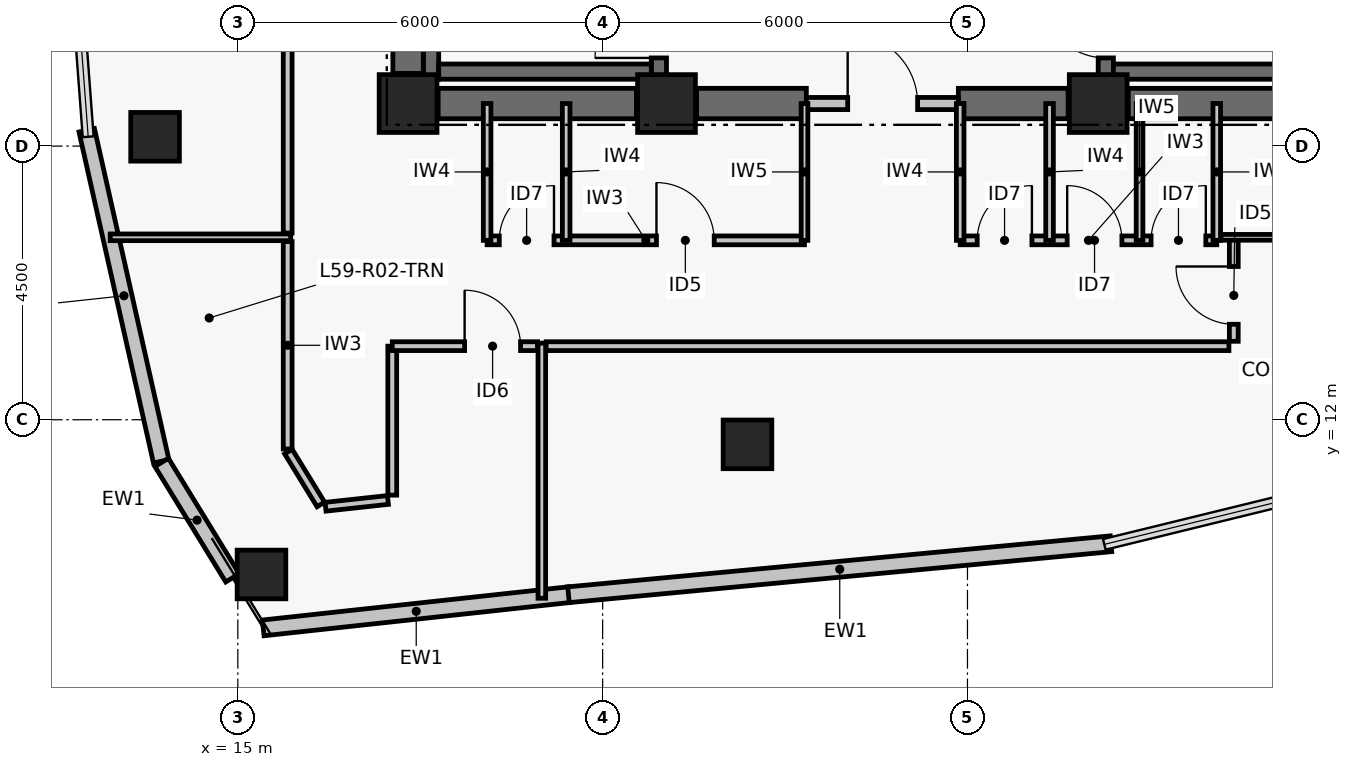
"""IFC4 building model, lengths in metres.
Left out: names, types, materials, properties, quantities, classifications, styles, units other than length and angle.
Written with IfcOpenShell. Run it as: python <this file> out.ifc"""

import sys

from ifc_helpers import new_model, si_unit, direction, frame, frame_2d, origin, origin_2d, place, context, subcontext, project, spatial, rectangle, hollow_rectangle, extrude, element, fill, save


model = new_model("IFC4")
c1 = context("Model", 3, precision=1e-05, world=origin(), true_north=direction((0.0, 1.0)))
c2 = subcontext(c1, "Body", "Model", "MODEL_VIEW")
j1 = project(units=[si_unit("LENGTHUNIT", "METRE"), si_unit("PLANEANGLEUNIT", "RADIAN")], contexts=[c1])
p1 = place(None, origin())
s1 = spatial("IfcSite", under=j1, at=p1, CompositionType="ELEMENT")
p2 = place(p1, origin())
s2 = spatial("IfcBuilding", under=s1, at=p2, CompositionType="ELEMENT")
p3 = place(p2, frame((0.0, 0.0, 234.42)))
s3 = spatial("IfcBuildingStorey", under=s2, at=p3, CompositionType="ELEMENT", Elevation=234.42)
for number, where, z_axis, x_axis in (
    (1, (17.8, 17.2, 0.0), (0.0, 0.0, 1.0), (1.0, 0.0, 0.0)),
    (2, (22.05, 17.2, 0.0), (0.0, 0.0, 1.0), (1.0, 0.0, 0.0)),
    (3, (29.15, 17.2, 0.0), (0.0, 0.0, 1.0), (1.0, 0.0, 0.0)),
):
    element("IfcColumn", number, at=place(p3, frame(where, z_axis=z_axis, x_axis=x_axis)), inside=s3, PredefinedType="COLUMN", context=c2, shape_type="SweptSolid", body=[
        extrude(rectangle(XDim=0.95, YDim=0.95, at=origin_2d()), origin(), (0.0, 0.0, 1.0), 3.72),
    ])
p4 = place(p3, frame((18.295, 17.2, 0.0), z_axis=(0.0, 0.0, 1.0), x_axis=(1.0, 0.0, 0.0)))
e4 = element("IfcWall", 4, at=p4, inside=s3, PredefinedType="SHEAR", context=c2, shape_type="SweptSolid", body=[
    extrude(rectangle(XDim=3.26, YDim=0.5, at=frame_2d((1.63, 0.0))), origin(), (0.0, 0.0, 1.0), 3.44),
])
p5 = place(p3, frame((22.545, 17.2, 0.0), z_axis=(0.0, 0.0, 1.0), x_axis=(1.0, 0.0, 0.0)))
e5 = element("IfcWall", 5, at=p5, inside=s3, PredefinedType="SHEAR", context=c2, shape_type="SweptSolid", body=[
    extrude(rectangle(XDim=1.805, YDim=0.5, at=frame_2d((0.903, 0.0))), origin(), (0.0, 0.0, 1.0), 3.44),
])
p6 = place(p3, frame((26.85, 17.2, 0.0), z_axis=(0.0, 0.0, 1.0), x_axis=(1.0, 0.0, 0.0)))
e6 = element("IfcWall", 6, at=p6, inside=s3, PredefinedType="SHEAR", context=c2, shape_type="SweptSolid", body=[
    extrude(rectangle(XDim=1.805, YDim=0.5, at=frame_2d((0.902, 0.0))), origin(), (0.0, 0.0, 1.0), 3.44),
])
p7 = place(p3, frame((29.645, 17.2, 0.0), z_axis=(0.0, 0.0, 1.0), x_axis=(1.0, 0.0, 0.0)))
e7 = element("IfcWall", 7, at=p7, inside=s3, PredefinedType="SHEAR", context=c2, shape_type="SweptSolid", body=[
    extrude(rectangle(XDim=3.26, YDim=0.5, at=frame_2d((1.63, 0.0))), origin(), (0.0, 0.0, 1.0), 3.44),
])
p8 = place(p3, frame((17.8, 17.695, 0.0), z_axis=(0.0, 0.0, 1.0), x_axis=(0.0, 1.0, 0.0)))
e8 = element("IfcWall", 8, at=p8, inside=s3, PredefinedType="SHEAR", context=c2, shape_type="SweptSolid", body=[
    extrude(rectangle(XDim=8.61, YDim=0.5, at=frame_2d((4.305, 0.0))), origin(), (0.0, 0.0, 1.0), 3.44),
])
p9 = place(p3, frame((18.179, 17.6, 0.0), z_axis=(0.0, 0.0, 1.0), x_axis=(0.0, 1.0, 0.0)))
e9 = element("IfcWall", 9, at=p9, inside=s3, PredefinedType="SHEAR", context=c2, shape_type="SweptSolid", body=[
    extrude(rectangle(XDim=8.8, YDim=0.25, at=frame_2d((4.4, 0.0))), origin(), (0.0, 0.0, 1.0), 3.44),
])
p10 = place(p3, frame((21.925, 17.6, 0.0), z_axis=(0.0, 0.0, 1.0), x_axis=(0.0, 1.0, 0.0)))
e10 = element("IfcWall", 10, at=p10, inside=s3, PredefinedType="SHEAR", context=c2, shape_type="SweptSolid", body=[
    extrude(rectangle(XDim=8.8, YDim=0.25, at=frame_2d((4.4, 0.0))), origin(), (0.0, 0.0, 1.0), 3.44),
])
p11 = place(p10, frame((0.35, 0.0, 0.0)))
e11 = element("IfcOpeningElement", 11, at=p11, cuts=e10, PredefinedType="OPENING", context=c2, shape_type="SweptSolid", body=[
    extrude(rectangle(XDim=1.05, YDim=2.08, at=frame_2d((0.525, 1.04))), frame((0.0, 0.135, 0.0), z_axis=(0.0, -1.0, 0.0), x_axis=(1.0, 0.0, 0.0)), (0.0, 0.0, 1.0), 0.27),
])
p12 = place(p3, frame((18.304, 17.725, 0.0), z_axis=(0.0, 0.0, 1.0), x_axis=(1.0, 0.0, 0.0)))
e12 = element("IfcWall", 12, at=p12, inside=s3, PredefinedType="SHEAR", context=c2, shape_type="SweptSolid", body=[
    extrude(rectangle(XDim=3.496, YDim=0.25, at=frame_2d((1.748, 0.0))), origin(), (0.0, 0.0, 1.0), 3.44),
])
p13 = place(p3, frame((29.275, 17.6, 0.0), z_axis=(0.0, 0.0, 1.0), x_axis=(0.0, 1.0, 0.0)))
e13 = element("IfcWall", 13, at=p13, inside=s3, PredefinedType="SHEAR", context=c2, shape_type="SweptSolid", body=[
    extrude(rectangle(XDim=8.8, YDim=0.25, at=frame_2d((4.4, 0.0))), origin(), (0.0, 0.0, 1.0), 3.44),
])
p14 = place(p13, frame((0.35, 0.0, 0.0)))
e14 = element("IfcOpeningElement", 14, at=p14, cuts=e13, PredefinedType="OPENING", context=c2, shape_type="SweptSolid", body=[
    extrude(rectangle(XDim=1.05, YDim=2.08, at=frame_2d((0.525, 1.04))), frame((0.0, 0.135, 0.0), z_axis=(0.0, -1.0, 0.0), x_axis=(1.0, 0.0, 0.0)), (0.0, 0.0, 1.0), 0.27),
])
p15 = place(p3, frame((29.4, 17.725, 0.0), z_axis=(0.0, 0.0, 1.0), x_axis=(1.0, 0.0, 0.0)))
e15 = element("IfcWall", 15, at=p15, inside=s3, PredefinedType="SHEAR", context=c2, shape_type="SweptSolid", body=[
    extrude(rectangle(XDim=3.496, YDim=0.25, at=frame_2d((1.748, 0.0))), origin(), (0.0, 0.0, 1.0), 3.44),
])
for number, where, z_axis, x_axis in (
    (16, (13.639, 16.653, 0.0), (0.0, 0.0, 1.0), (1.0, 0.0, 0.0)),
    (17, (15.389, 9.455, 0.0), (0.0, 0.0, 1.0), (1.0, 0.0, 0.0)),
    (18, (23.382, 11.595, 0.0), (0.0, 0.0, 1.0), (1.0, 0.0, 0.0)),
):
    element("IfcColumn", number, at=place(p3, frame(where, z_axis=z_axis, x_axis=x_axis)), inside=s3, PredefinedType="COLUMN", context=c2, shape_type="SweptSolid", body=[
        extrude(hollow_rectangle(XDim=0.8, YDim=0.8, WallThickness=0.035, at=origin_2d()), origin(), (0.0, 0.0, 1.0), 3.72),
    ])
p16 = place(p3, frame((13.74, 11.317, 0.0), z_axis=(0.0, 0.0, 1.0), x_axis=(-0.219510112872, 0.975610224601, 0.0)))
e19 = element("IfcWall", 19, at=p16, inside=s3, PredefinedType="PARTITIONING", context=c2, shape_type="SweptSolid", body=[
    extrude(rectangle(XDim=5.58, YDim=0.26, at=frame_2d((2.79, 0.0))), origin(), (0.0, 0.0, 1.0), 3.44),
])
p17 = place(p3, frame((14.912, 9.4, 0.0), z_axis=(0.0, 0.0, 1.0), x_axis=(-0.52314291314, 0.852244972077, 0.0)))
e20 = element("IfcWall", 20, at=p17, inside=s3, PredefinedType="PARTITIONING", context=c2, shape_type="SweptSolid", body=[
    extrude(rectangle(XDim=2.227, YDim=0.26, at=frame_2d((1.114, 0.0))), origin(), (0.0, 0.0, 1.0), 3.44),
])
p18 = place(p3, frame((20.45, 9.123, 0.0), z_axis=(0.0, 0.0, 1.0), x_axis=(-0.994158757437, -0.107927591518, 0.0)))
e21 = element("IfcWall", 21, at=p18, inside=s3, PredefinedType="PARTITIONING", context=c2, shape_type="SweptSolid", body=[
    extrude(rectangle(XDim=5.062, YDim=0.26, at=frame_2d((2.531, 0.0))), origin(), (0.0, 0.0, 1.0), 3.44),
])
p19 = place(p3, frame((29.36, 9.96, 0.0), z_axis=(0.0, 0.0, 1.0), x_axis=(-0.995616246459, -0.093532292754, 0.0)))
e22 = element("IfcWall", 22, at=p19, inside=s3, PredefinedType="PARTITIONING", context=c2, shape_type="SweptSolid", body=[
    extrude(rectangle(XDim=8.961, YDim=0.26, at=frame_2d((4.48, 0.0))), origin(), (0.0, 0.0, 1.0), 3.44),
])
p20 = place(p3, frame((24.35, 17.2, 0.0), z_axis=(0.0, 0.0, 1.0), x_axis=(1.0, 0.0, 0.0)))
e23 = element("IfcWall", 23, at=p20, inside=s3, PredefinedType="PARTITIONING", context=c2, shape_type="SweptSolid", body=[
    extrude(rectangle(XDim=2.5, YDim=0.2, at=frame_2d((1.25, 0.0))), origin(), (0.0, 0.0, 1.0), 2.57),
])
p21 = place(p20, frame((0.68, 0.0, 0.0)))
e24 = element("IfcOpeningElement", 24, at=p21, cuts=e23, PredefinedType="OPENING", context=c2, shape_type="SweptSolid", body=[
    extrude(rectangle(XDim=1.15, YDim=2.08, at=frame_2d((0.575, 1.04))), frame((0.0, 0.11, 0.0), z_axis=(0.0, -1.0, 0.0), x_axis=(1.0, 0.0, 0.0)), (0.0, 0.0, 1.0), 0.22),
])
p22 = place(p3, frame((19.1, 14.95, 0.0), z_axis=(0.0, 0.0, 1.0), x_axis=(1.0, 0.0, 0.0)))
e25 = element("IfcWall", 25, at=p22, inside=s3, PredefinedType="PARTITIONING", context=c2, shape_type="SweptSolid", body=[
    extrude(rectangle(XDim=5.22, YDim=0.145, at=frame_2d((2.61, 0.0))), origin(), (0.0, 0.0, 1.0), 2.72),
])
p23 = place(p22, frame((0.2, 0.0, 0.0)))
e26 = element("IfcOpeningElement", 26, at=p23, cuts=e25, PredefinedType="OPENING", context=c2, shape_type="SweptSolid", body=[
    extrude(rectangle(XDim=0.9, YDim=2.02, at=frame_2d((0.45, 1.01))), frame((0.0, 0.083, 0.0), z_axis=(0.0, -1.0, 0.0), x_axis=(1.0, 0.0, 0.0)), (0.0, 0.0, 1.0), 0.165),
])
p24 = place(p22, frame((2.785, 0.0, 0.0)))
e27 = element("IfcOpeningElement", 27, at=p24, cuts=e25, PredefinedType="OPENING", context=c2, shape_type="SweptSolid", body=[
    extrude(rectangle(XDim=0.95, YDim=2.06, at=frame_2d((0.475, 1.03))), frame((0.0, 0.083, 0.0), z_axis=(0.0, -1.0, 0.0), x_axis=(1.0, 0.0, 0.0)), (0.0, 0.0, 1.0), 0.165),
])
p25 = place(p3, frame((26.88, 14.95, 0.0), z_axis=(0.0, 0.0, 1.0), x_axis=(1.0, 0.0, 0.0)))
e28 = element("IfcWall", 28, at=p25, inside=s3, PredefinedType="PARTITIONING", context=c2, shape_type="SweptSolid", body=[
    extrude(rectangle(XDim=4.22, YDim=0.145, at=frame_2d((2.11, 0.0))), origin(), (0.0, 0.0, 1.0), 2.92),
])
p26 = place(p25, frame((0.28, 0.0, 0.0)))
e29 = element("IfcOpeningElement", 29, at=p26, cuts=e28, PredefinedType="OPENING", context=c2, shape_type="SweptSolid", body=[
    extrude(rectangle(XDim=0.9, YDim=2.02, at=frame_2d((0.45, 1.01))), frame((0.0, 0.083, 0.0), z_axis=(0.0, -1.0, 0.0), x_axis=(1.0, 0.0, 0.0)), (0.0, 0.0, 1.0), 0.165),
])
p27 = place(p25, frame((1.76, 0.0, 0.0)))
e30 = element("IfcOpeningElement", 30, at=p27, cuts=e28, PredefinedType="OPENING", context=c2, shape_type="SweptSolid", body=[
    extrude(rectangle(XDim=0.9, YDim=2.02, at=frame_2d((0.45, 1.01))), frame((0.0, 0.083, 0.0), z_axis=(0.0, -1.0, 0.0), x_axis=(1.0, 0.0, 0.0)), (0.0, 0.0, 1.0), 0.165),
])
p28 = place(p25, frame((3.14, 0.0, 0.0)))
e31 = element("IfcOpeningElement", 31, at=p28, cuts=e28, PredefinedType="OPENING", context=c2, shape_type="SweptSolid", body=[
    extrude(rectangle(XDim=0.9, YDim=2.02, at=frame_2d((0.45, 1.01))), frame((0.0, 0.083, 0.0), z_axis=(0.0, -1.0, 0.0), x_axis=(1.0, 0.0, 0.0)), (0.0, 0.0, 1.0), 0.165),
])
for number, where, z_axis, x_axis in (
    (32, (19.1, 14.95, 0.0), (0.0, 0.0, 1.0), (0.0, 1.0, 0.0)),
    (33, (20.4, 14.95, 0.0), (0.0, 0.0, 1.0), (0.0, 1.0, 0.0)),
):
    element("IfcWall", number, at=place(p3, frame(where, z_axis=z_axis, x_axis=x_axis)), inside=s3, PredefinedType="PARTITIONING", context=c2, shape_type="SweptSolid", body=[
        extrude(rectangle(XDim=2.25, YDim=0.125, at=frame_2d((1.125, 0.0))), origin(), (0.0, 0.0, 1.0), 2.57),
    ])
p29 = place(p3, frame((24.32, 14.95, 0.0), z_axis=(0.0, 0.0, 1.0), x_axis=(0.0, 1.0, 0.0)))
e34 = element("IfcWall", 34, at=p29, inside=s3, PredefinedType="PARTITIONING", context=c2, shape_type="SweptSolid", body=[
    extrude(rectangle(XDim=2.25, YDim=0.11, at=frame_2d((1.125, 0.0))), origin(), (0.0, 0.0, 1.0), 2.57),
])
for number, where, z_axis, x_axis in (
    (35, (26.88, 14.95, 0.0), (0.0, 0.0, 1.0), (0.0, 1.0, 0.0)),
    (36, (28.35, 14.95, 0.0), (0.0, 0.0, 1.0), (0.0, 1.0, 0.0)),
):
    element("IfcWall", number, at=place(p3, frame(where, z_axis=z_axis, x_axis=x_axis)), inside=s3, PredefinedType="PARTITIONING", context=c2, shape_type="SweptSolid", body=[
        extrude(rectangle(XDim=2.25, YDim=0.125, at=frame_2d((1.125, 0.0))), origin(), (0.0, 0.0, 1.0), 2.57),
    ])
p30 = place(p3, frame((29.83, 14.95, 0.0), z_axis=(0.0, 0.0, 1.0), x_axis=(0.0, 1.0, 0.0)))
e37 = element("IfcWall", 37, at=p30, inside=s3, PredefinedType="PARTITIONING", context=c2, shape_type="SweptSolid", body=[
    extrude(rectangle(XDim=2.25, YDim=0.11, at=frame_2d((1.125, 0.0))), origin(), (0.0, 0.0, 1.0), 2.57),
])
p31 = place(p3, frame((31.1, 14.95, 0.0), z_axis=(0.0, 0.0, 1.0), x_axis=(0.0, 1.0, 0.0)))
e38 = element("IfcWall", 38, at=p31, inside=s3, PredefinedType="PARTITIONING", context=c2, shape_type="SweptSolid", body=[
    extrude(rectangle(XDim=2.25, YDim=0.125, at=frame_2d((1.125, 0.0))), origin(), (0.0, 0.0, 1.0), 2.57),
])
p32 = place(p3, frame((15.82, 14.93, 0.0), z_axis=(0.0, 0.0, 1.0), x_axis=(0.0, -1.0, 0.0)))
e39 = element("IfcWall", 39, at=p32, inside=s3, PredefinedType="PARTITIONING", context=c2, shape_type="SweptSolid", body=[
    extrude(rectangle(XDim=3.411, YDim=0.145, at=frame_2d((1.706, 0.0))), origin(), (0.0, 0.0, 1.0), 2.72),
])
p33 = place(p3, frame((15.832, 11.477, 0.0), z_axis=(0.0, 0.0, 1.0), x_axis=(0.523122844464, -0.852257290729, 0.0)))
e40 = element("IfcWall", 40, at=p33, inside=s3, PredefinedType="PARTITIONING", context=c2, shape_type="SweptSolid", body=[
    extrude(rectangle(XDim=1.021, YDim=0.145, at=frame_2d((0.51, 0.0))), origin(), (0.0, 0.0, 1.0), 2.72),
])
p34 = place(p3, frame((16.442, 10.569, 0.0), z_axis=(0.0, 0.0, 1.0), x_axis=(0.994140595739, 0.108094754283, 0.0)))
e41 = element("IfcWall", 41, at=p34, inside=s3, PredefinedType="PARTITIONING", context=c2, shape_type="SweptSolid", body=[
    extrude(rectangle(XDim=1.032, YDim=0.145, at=frame_2d((0.516, 0.0))), origin(), (0.0, 0.0, 1.0), 3.44),
])
p35 = place(p3, frame((17.54, 10.76, 0.0), z_axis=(0.0, 0.0, 1.0), x_axis=(0.0, 1.0, 0.0)))
e42 = element("IfcWall", 42, at=p35, inside=s3, PredefinedType="PARTITIONING", context=c2, shape_type="SweptSolid", body=[
    extrude(rectangle(XDim=2.45, YDim=0.145, at=frame_2d((1.225, 0.0))), origin(), (0.0, 0.0, 1.0), 3.07),
])
p36 = place(p3, frame((17.54, 13.21, 0.0), z_axis=(0.0, 0.0, 1.0), x_axis=(1.0, 0.0, 0.0)))
e43 = element("IfcWall", 43, at=p36, inside=s3, PredefinedType="PARTITIONING", context=c2, shape_type="SweptSolid", body=[
    extrude(rectangle(XDim=2.39, YDim=0.145, at=frame_2d((1.195, 0.0))), origin(), (0.0, 0.0, 1.0), 3.07),
])
p37 = place(p36, frame((1.19, 0.0, 0.0)))
e44 = element("IfcOpeningElement", 44, at=p37, cuts=e43, PredefinedType="OPENING", context=c2, shape_type="SweptSolid", body=[
    extrude(rectangle(XDim=0.92, YDim=2.05, at=frame_2d((0.46, 1.025))), frame((0.0, 0.083, 0.0), z_axis=(0.0, -1.0, 0.0), x_axis=(1.0, 0.0, 0.0)), (0.0, 0.0, 1.0), 0.165),
])
p38 = place(p3, frame((20.07, 13.21, 0.0), z_axis=(0.0, 0.0, 1.0), x_axis=(1.0, 0.0, 0.0)))
e45 = element("IfcWall", 45, at=p38, inside=s3, PredefinedType="PARTITIONING", context=c2, shape_type="SweptSolid", body=[
    extrude(rectangle(XDim=11.23, YDim=0.145, at=frame_2d((5.615, 0.0))), origin(), (0.0, 0.0, 1.0), 2.72),
])
p39 = place(p3, frame((31.38, 13.29, 0.0), z_axis=(0.0, 0.0, 1.0), x_axis=(0.0, 1.0, 0.0)))
e46 = element("IfcWall", 46, at=p39, inside=s3, PredefinedType="PARTITIONING", context=c2, shape_type="SweptSolid", body=[
    extrude(rectangle(XDim=1.71, YDim=0.145, at=frame_2d((0.855, 0.0))), origin(), (0.0, 0.0, 1.0), 3.44),
])
p40 = place(p39, frame((0.28, 0.0, 0.0)))
e47 = element("IfcOpeningElement", 47, at=p40, cuts=e46, PredefinedType="OPENING", context=c2, shape_type="SweptSolid", body=[
    extrude(rectangle(XDim=0.95, YDim=2.06, at=frame_2d((0.475, 1.03))), frame((0.0, 0.083, 0.0), z_axis=(0.0, -1.0, 0.0), x_axis=(1.0, 0.0, 0.0)), (0.0, 0.0, 1.0), 0.165),
])
p41 = place(p3, frame((15.82, 28.93, 0.0), z_axis=(0.0, 0.0, 1.0), x_axis=(0.0, -1.0, 0.0)))
e48 = element("IfcWall", 48, at=p41, inside=s3, PredefinedType="PARTITIONING", context=c2, shape_type="SweptSolid", body=[
    extrude(rectangle(XDim=13.86, YDim=0.145, at=frame_2d((6.93, 0.0))), origin(), (0.0, 0.0, 1.0), 2.72),
])
p42 = place(p41, frame((6.455, 0.0, 0.0)))
e49 = element("IfcOpeningElement", 49, at=p42, cuts=e48, PredefinedType="OPENING", context=c2, shape_type="SweptSolid", body=[
    extrude(rectangle(XDim=0.95, YDim=2.06, at=frame_2d((0.475, 1.03))), frame((0.0, 0.083, 0.0), z_axis=(0.0, -1.0, 0.0), x_axis=(1.0, 0.0, 0.0)), (0.0, 0.0, 1.0), 0.165),
])
p43 = place(p3, frame((20.0, 9.064, 0.0), z_axis=(0.0, 0.0, 1.0), x_axis=(0.0, 1.0, 0.0)))
e50 = element("IfcWall", 50, at=p43, inside=s3, PredefinedType="PARTITIONING", context=c2, shape_type="SweptSolid", body=[
    extrude(rectangle(XDim=4.196, YDim=0.125, at=frame_2d((2.098, 0.0))), origin(), (0.0, 0.0, 1.0), 2.92),
])
p44 = place(p3, frame((12.901, 15.0, 0.0), z_axis=(0.0, 0.0, 1.0), x_axis=(1.0, 0.0, 0.0)))
e51 = element("IfcWall", 51, at=p44, inside=s3, PredefinedType="PARTITIONING", context=c2, shape_type="SweptSolid", body=[
    extrude(rectangle(XDim=2.969, YDim=0.11, at=frame_2d((1.485, 0.0))), origin(), (0.0, 0.0, 1.0), 2.92),
])
p45 = place(p3, frame((31.17, 15.0, 0.0), z_axis=(0.0, 0.0, 1.0), x_axis=(1.0, 0.0, 0.0)))
e52 = element("IfcWall", 52, at=p45, inside=s3, PredefinedType="PARTITIONING", context=c2, shape_type="SweptSolid", body=[
    extrude(rectangle(XDim=13.795, YDim=0.095, at=frame_2d((6.897, 0.0))), origin(), (0.0, 0.0, 1.0), 3.44),
])
p46 = place(p45, frame((7.951, 0.0, 0.0)))
e53 = element("IfcOpeningElement", 53, at=p46, cuts=e52, PredefinedType="OPENING", context=c2, shape_type="SweptSolid", body=[
    extrude(rectangle(XDim=0.92, YDim=2.05, at=frame_2d((0.46, 1.025))), frame((0.0, 0.057, 0.0), z_axis=(0.0, -1.0, 0.0), x_axis=(1.0, 0.0, 0.0)), (0.0, 0.0, 1.0), 0.115),
])
p47 = place(p11, origin())
e54 = element("IfcDoor", 54, at=p47, inside=s3, OperationType="SINGLE_SWING_LEFT", PredefinedType="DOOR", context=c2, shape_type="SweptSolid", body=[
    extrude(rectangle(XDim=1.05, YDim=2.08, at=frame_2d((0.525, 1.04))), frame((0.0, 0.025, 0.0), z_axis=(0.0, -1.0, 0.0), x_axis=(1.0, 0.0, 0.0)), (0.0, 0.0, 1.0), 0.05),
])
fill(e11, e54)
p48 = place(p14, origin())
e55 = element("IfcDoor", 55, at=p48, inside=s3, OperationType="SINGLE_SWING_RIGHT", PredefinedType="DOOR", context=c2, shape_type="SweptSolid", body=[
    extrude(rectangle(XDim=1.05, YDim=2.08, at=frame_2d((0.525, 1.04))), frame((0.0, 0.025, 0.0), z_axis=(0.0, -1.0, 0.0), x_axis=(1.0, 0.0, 0.0)), (0.0, 0.0, 1.0), 0.05),
])
fill(e14, e55)
p49 = place(p21, origin())
e56 = element("IfcDoor", 56, at=p49, inside=s3, OperationType="SINGLE_SWING_LEFT", PredefinedType="DOOR", context=c2, shape_type="SweptSolid", body=[
    extrude(rectangle(XDim=1.15, YDim=2.08, at=frame_2d((0.575, 1.04))), frame((0.0, 0.025, 0.0), z_axis=(0.0, -1.0, 0.0), x_axis=(1.0, 0.0, 0.0)), (0.0, 0.0, 1.0), 0.05),
])
fill(e24, e56)
p50 = place(p23, origin())
e57 = element("IfcDoor", 57, at=p50, inside=s3, OperationType="SINGLE_SWING_RIGHT", PredefinedType="DOOR", context=c2, shape_type="SweptSolid", body=[
    extrude(rectangle(XDim=0.9, YDim=2.02, at=frame_2d((0.45, 1.01))), frame((0.0, 0.025, 0.0), z_axis=(0.0, -1.0, 0.0), x_axis=(1.0, 0.0, 0.0)), (0.0, 0.0, 1.0), 0.05),
])
fill(e26, e57)
p51 = place(p24, origin())
e58 = element("IfcDoor", 58, at=p51, inside=s3, OperationType="SINGLE_SWING_LEFT", PredefinedType="DOOR", context=c2, shape_type="SweptSolid", body=[
    extrude(rectangle(XDim=0.95, YDim=2.06, at=frame_2d((0.475, 1.03))), frame((0.0, 0.025, 0.0), z_axis=(0.0, -1.0, 0.0), x_axis=(1.0, 0.0, 0.0)), (0.0, 0.0, 1.0), 0.05),
])
fill(e27, e58)
p52 = place(p26, origin())
e59 = element("IfcDoor", 59, at=p52, inside=s3, OperationType="SINGLE_SWING_RIGHT", PredefinedType="DOOR", context=c2, shape_type="SweptSolid", body=[
    extrude(rectangle(XDim=0.9, YDim=2.02, at=frame_2d((0.45, 1.01))), frame((0.0, 0.025, 0.0), z_axis=(0.0, -1.0, 0.0), x_axis=(1.0, 0.0, 0.0)), (0.0, 0.0, 1.0), 0.05),
])
fill(e29, e59)
p53 = place(p27, origin())
e60 = element("IfcDoor", 60, at=p53, inside=s3, OperationType="SINGLE_SWING_LEFT", PredefinedType="DOOR", context=c2, shape_type="SweptSolid", body=[
    extrude(rectangle(XDim=0.9, YDim=2.02, at=frame_2d((0.45, 1.01))), frame((0.0, 0.025, 0.0), z_axis=(0.0, -1.0, 0.0), x_axis=(1.0, 0.0, 0.0)), (0.0, 0.0, 1.0), 0.05),
])
fill(e30, e60)
p54 = place(p28, origin())
e61 = element("IfcDoor", 61, at=p54, inside=s3, OperationType="SINGLE_SWING_RIGHT", PredefinedType="DOOR", context=c2, shape_type="SweptSolid", body=[
    extrude(rectangle(XDim=0.9, YDim=2.02, at=frame_2d((0.45, 1.01))), frame((0.0, 0.025, 0.0), z_axis=(0.0, -1.0, 0.0), x_axis=(1.0, 0.0, 0.0)), (0.0, 0.0, 1.0), 0.05),
])
fill(e31, e61)
p55 = place(p37, origin())
e62 = element("IfcDoor", 62, at=p55, inside=s3, OperationType="SINGLE_SWING_LEFT", PredefinedType="DOOR", context=c2, shape_type="SweptSolid", body=[
    extrude(rectangle(XDim=0.92, YDim=2.05, at=frame_2d((0.46, 1.025))), frame((0.0, 0.025, 0.0), z_axis=(0.0, -1.0, 0.0), x_axis=(1.0, 0.0, 0.0)), (0.0, 0.0, 1.0), 0.05),
])
fill(e44, e62)
p56 = place(p40, origin())
e63 = element("IfcDoor", 63, at=p56, inside=s3, OperationType="SINGLE_SWING_RIGHT", PredefinedType="DOOR", context=c2, shape_type="SweptSolid", body=[
    extrude(rectangle(XDim=0.95, YDim=2.06, at=frame_2d((0.475, 1.03))), frame((0.0, 0.025, 0.0), z_axis=(0.0, -1.0, 0.0), x_axis=(1.0, 0.0, 0.0)), (0.0, 0.0, 1.0), 0.05),
])
fill(e47, e63)
save(model, sys.argv[1])
